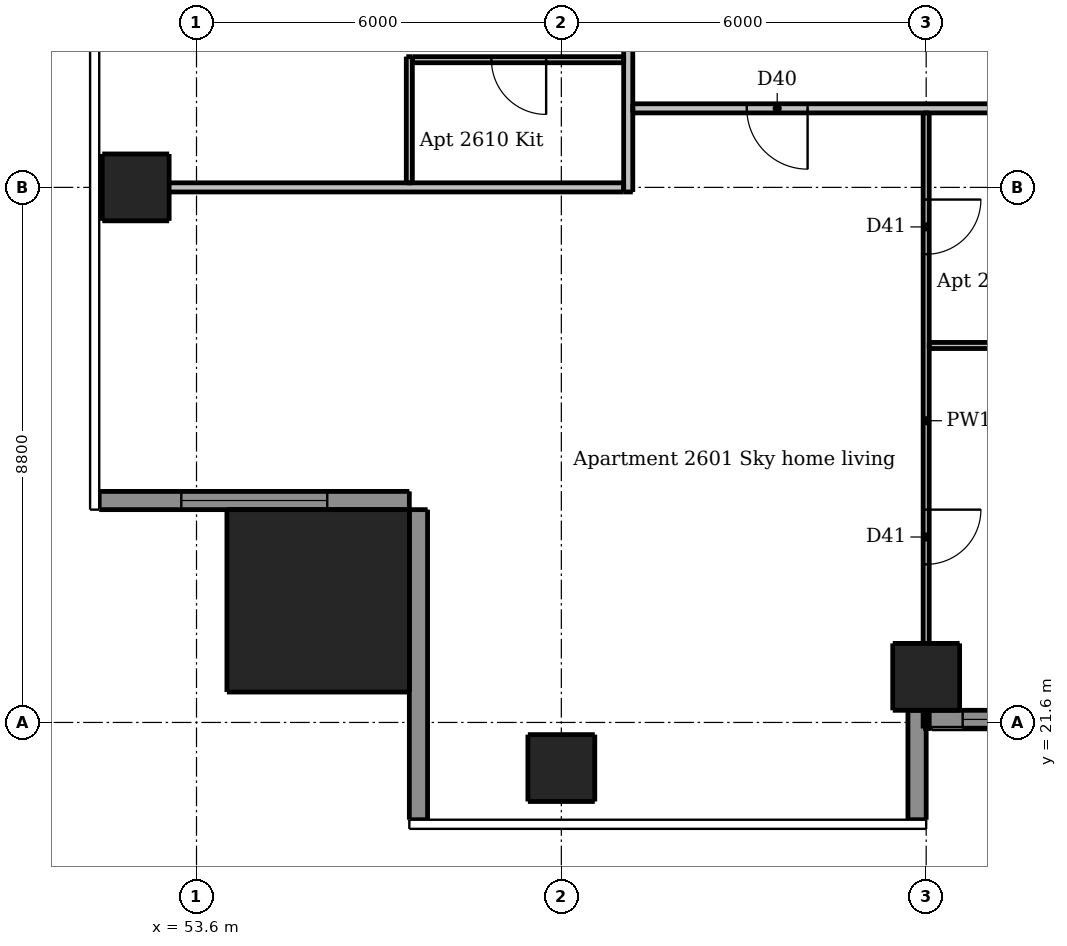
"""IFC4 building model, lengths in metres.
Left out: names, types, materials, properties, quantities, classifications, styles, units other than length and angle.
Written with IfcOpenShell. Run it as: python <this file> out.ifc"""

import sys

from ifc_helpers import new_model, si_unit, direction, frame, frame_2d, origin, origin_2d, place, context, subcontext, project, spatial, rectangle, extrude, element, fill, save


model = new_model("IFC4")
c1 = context("Model", 3, precision=1e-05, world=origin(), true_north=direction((0.0, 1.0)))
c2 = subcontext(c1, "Body", "Model", "MODEL_VIEW")
j1 = project(units=[si_unit("LENGTHUNIT", "METRE"), si_unit("PLANEANGLEUNIT", "RADIAN")], contexts=[c1])
p1 = place(None, origin())
s1 = spatial("IfcSite", under=j1, at=p1, CompositionType="ELEMENT")
p2 = place(p1, origin())
s2 = spatial("IfcBuilding", under=s1, at=p2, CompositionType="ELEMENT")
p3 = place(p2, frame((0.0, 0.0, 98.5)))
s3 = spatial("IfcBuildingStorey", under=s2, at=p3, CompositionType="ELEMENT", Elevation=98.5)
for number, where, z_axis, x_axis in (
    (1, (59.6, 20.85, 0.0), (0.0, 0.0, 1.0), (1.0, 0.0, 0.0)),
    (2, (65.6, 22.35, 0.0), (0.0, 0.0, 1.0), (1.0, 0.0, 0.0)),
    (3, (52.6, 30.4, 0.0), (0.0, 0.0, 1.0), (1.0, 0.0, 0.0)),
):
    element("IfcColumn", number, at=place(p3, frame(where, z_axis=z_axis, x_axis=x_axis)), inside=s3, PredefinedType="COLUMN", context=c2, shape_type="SweptSolid", body=[
        extrude(rectangle(XDim=1.1, YDim=1.1, at=origin_2d()), origin(), (0.0, 0.0, 1.0), 3.05),
    ])
p4 = place(p3, frame((55.6, 23.6, 0.0), z_axis=(0.0, 0.0, 1.0), x_axis=(1.0, 0.0, 0.0)))
e4 = element("IfcColumn", 4, at=p4, inside=s3, PredefinedType="COLUMN", context=c2, shape_type="SweptSolid", body=[
    extrude(rectangle(XDim=3.0, YDim=3.0, at=origin_2d()), origin(), (0.0, 0.0, 1.0), 3.3),
])
p5 = place(p3, frame((65.45, 20.0, 0.0), z_axis=(0.0, 0.0, 1.0), x_axis=(0.0, 1.0, 0.0)))
e5 = element("IfcWall", 5, at=p5, inside=s3, PredefinedType="SOLIDWALL", context=c2, shape_type="SweptSolid", body=[
    extrude(rectangle(XDim=1.8, YDim=0.3, at=frame_2d((0.9, 0.0))), origin(), (0.0, 0.0, 1.0), 3.05),
])
p6 = place(p3, frame((52.0, 25.25, 0.0), z_axis=(0.0, 0.0, 1.0), x_axis=(1.0, 0.0, 0.0)))
e6 = element("IfcWall", 6, at=p6, inside=s3, PredefinedType="SOLIDWALL", context=c2, shape_type="SweptSolid", body=[
    extrude(rectangle(XDim=5.1, YDim=0.3, at=frame_2d((2.55, 0.0))), origin(), (0.0, 0.0, 1.0), 3.05),
])
p7 = place(p6, frame((1.35, 0.0, 0.15)))
e7 = element("IfcOpeningElement", 7, at=p7, cuts=e6, PredefinedType="OPENING", context=c2, shape_type="SweptSolid", body=[
    extrude(rectangle(XDim=2.4, YDim=2.1, at=frame_2d((1.2, 1.05))), frame((0.0, 0.16, 0.0), z_axis=(0.0, -1.0, 0.0), x_axis=(1.0, 0.0, 0.0)), (0.0, 0.0, 1.0), 0.32),
])
p8 = place(p3, frame((57.25, 25.1, 0.0), z_axis=(0.0, 0.0, 1.0), x_axis=(0.0, -1.0, 0.0)))
e8 = element("IfcWall", 8, at=p8, inside=s3, PredefinedType="SOLIDWALL", context=c2, shape_type="SweptSolid", body=[
    extrude(rectangle(XDim=5.1, YDim=0.3, at=frame_2d((2.55, 0.0))), origin(), (0.0, 0.0, 1.0), 3.05),
])
p9 = place(p3, frame((65.6, 21.65, 0.0), z_axis=(0.0, 0.0, 1.0), x_axis=(1.0, 0.0, 0.0)))
e9 = element("IfcWall", 9, at=p9, inside=s3, PredefinedType="SOLIDWALL", context=c2, shape_type="SweptSolid", body=[
    extrude(rectangle(XDim=6.0, YDim=0.3, at=frame_2d((3.0, 0.0))), origin(), (0.0, 0.0, 1.0), 3.05),
])
p10 = place(p9, frame((0.6, 0.0, 0.15)))
e10 = element("IfcOpeningElement", 10, at=p10, cuts=e9, PredefinedType="OPENING", context=c2, shape_type="SweptSolid", body=[
    extrude(rectangle(XDim=1.8, YDim=2.1, at=frame_2d((0.9, 1.05))), frame((0.0, 0.16, 0.0), z_axis=(0.0, -1.0, 0.0), x_axis=(1.0, 0.0, 0.0)), (0.0, 0.0, 1.0), 0.32),
])
p11 = place(p9, frame((3.6, 0.0, 0.15)))
e11 = element("IfcOpeningElement", 11, at=p11, cuts=e9, PredefinedType="OPENING", context=c2, shape_type="SweptSolid", body=[
    extrude(rectangle(XDim=1.8, YDim=2.1, at=frame_2d((0.9, 1.05))), frame((0.0, 0.16, 0.0), z_axis=(0.0, -1.0, 0.0), x_axis=(1.0, 0.0, 0.0)), (0.0, 0.0, 1.0), 0.32),
])
p12 = place(p3, frame((57.1, 30.475, 0.0), z_axis=(0.0, 0.0, 1.0), x_axis=(0.0, 1.0, 0.0)))
e12 = element("IfcWall", 12, at=p12, inside=s3, PredefinedType="PARTITIONING", context=c2, shape_type="SweptSolid", body=[
    extrude(rectangle(XDim=2.075, YDim=0.1, at=frame_2d((1.038, 0.0))), origin(), (0.0, 0.0, 1.0), 3.05),
])
p13 = place(p3, frame((65.6, 31.625, 0.0), z_axis=(0.0, 0.0, 1.0), x_axis=(0.0, -1.0, 0.0)))
e13 = element("IfcWall", 13, at=p13, inside=s3, PredefinedType="PARTITIONING", context=c2, shape_type="SweptSolid", body=[
    extrude(rectangle(XDim=10.125, YDim=0.1, at=frame_2d((5.062, 0.0))), origin(), (0.0, 0.0, 1.0), 2.516),
])
p14 = place(p13, frame((1.425, 0.0, 0.0)))
e14 = element("IfcOpeningElement", 14, at=p14, cuts=e13, PredefinedType="OPENING", context=c2, shape_type="SweptSolid", body=[
    extrude(rectangle(XDim=0.9, YDim=2.1, at=frame_2d((0.45, 1.05))), frame((0.0, 0.06, 0.0), z_axis=(0.0, -1.0, 0.0), x_axis=(1.0, 0.0, 0.0)), (0.0, 0.0, 1.0), 0.12),
])
p15 = place(p13, frame((6.525, 0.0, 0.0)))
e15 = element("IfcOpeningElement", 15, at=p15, cuts=e13, PredefinedType="OPENING", context=c2, shape_type="SweptSolid", body=[
    extrude(rectangle(XDim=0.9, YDim=2.1, at=frame_2d((0.45, 1.05))), frame((0.0, 0.06, 0.0), z_axis=(0.0, -1.0, 0.0), x_axis=(1.0, 0.0, 0.0)), (0.0, 0.0, 1.0), 0.12),
])
p16 = place(p3, frame((60.625, 32.5, 0.0), z_axis=(0.0, 0.0, 1.0), x_axis=(-1.0, 0.0, 0.0)))
e16 = element("IfcWall", 16, at=p16, inside=s3, PredefinedType="PARTITIONING", context=c2, shape_type="SweptSolid", body=[
    extrude(rectangle(XDim=3.475, YDim=0.1, at=frame_2d((1.738, 0.0))), origin(), (0.0, 0.0, 1.0), 3.05),
])
p17 = place(p16, frame((1.275, 0.0, 0.0)))
e17 = element("IfcOpeningElement", 17, at=p17, cuts=e16, PredefinedType="OPENING", context=c2, shape_type="SweptSolid", body=[
    extrude(rectangle(XDim=0.9, YDim=2.1, at=frame_2d((0.45, 1.05))), frame((0.0, 0.06, 0.0), z_axis=(0.0, -1.0, 0.0), x_axis=(1.0, 0.0, 0.0)), (0.0, 0.0, 1.0), 0.12),
])
p18 = place(p3, frame((65.65, 27.8, 0.0), z_axis=(0.0, 0.0, 1.0), x_axis=(1.0, 0.0, 0.0)))
e18 = element("IfcWall", 18, at=p18, inside=s3, PredefinedType="PARTITIONING", context=c2, shape_type="SweptSolid", body=[
    extrude(rectangle(XDim=5.875, YDim=0.1, at=frame_2d((2.938, 0.0))), origin(), (0.0, 0.0, 1.0), 3.05),
])
p19 = place(p18, frame((3.75, 0.0, 0.0)))
e19 = element("IfcOpeningElement", 19, at=p19, cuts=e18, PredefinedType="OPENING", context=c2, shape_type="SweptSolid", body=[
    extrude(rectangle(XDim=0.8, YDim=2.1, at=frame_2d((0.4, 1.05))), frame((0.0, 0.06, 0.0), z_axis=(0.0, -1.0, 0.0), x_axis=(1.0, 0.0, 0.0)), (0.0, 0.0, 1.0), 0.12),
])
p20 = place(p3, frame((60.7, 30.325, 0.0), z_axis=(0.0, 0.0, 1.0), x_axis=(0.0, 1.0, 0.0)))
e20 = element("IfcWall", 20, at=p20, inside=s3, PredefinedType="PARTITIONING", context=c2, shape_type="SweptSolid", body=[
    extrude(rectangle(XDim=28.9, YDim=0.15, at=frame_2d((14.45, 0.0))), origin(), (0.0, 0.0, 1.0), 3.05),
])
p21 = place(p20, frame((2.575, 0.0, 0.0)))
e21 = element("IfcOpeningElement", 21, at=p21, cuts=e20, PredefinedType="OPENING", context=c2, shape_type="SweptSolid", body=[
    extrude(rectangle(XDim=1.0, YDim=2.1, at=frame_2d((0.5, 1.05))), frame((0.0, 0.085, 0.0), z_axis=(0.0, -1.0, 0.0), x_axis=(1.0, 0.0, 0.0)), (0.0, 0.0, 1.0), 0.17),
])
p22 = place(p20, frame((8.575, 0.0, 0.0)))
e22 = element("IfcOpeningElement", 22, at=p22, cuts=e20, PredefinedType="OPENING", context=c2, shape_type="SweptSolid", body=[
    extrude(rectangle(XDim=1.0, YDim=2.1, at=frame_2d((0.5, 1.05))), frame((0.0, 0.085, 0.0), z_axis=(0.0, -1.0, 0.0), x_axis=(1.0, 0.0, 0.0)), (0.0, 0.0, 1.0), 0.17),
])
p23 = place(p20, frame((14.575, 0.0, 0.0)))
e23 = element("IfcOpeningElement", 23, at=p23, cuts=e20, PredefinedType="OPENING", context=c2, shape_type="SweptSolid", body=[
    extrude(rectangle(XDim=1.0, YDim=2.1, at=frame_2d((0.5, 1.05))), frame((0.0, 0.085, 0.0), z_axis=(0.0, -1.0, 0.0), x_axis=(1.0, 0.0, 0.0)), (0.0, 0.0, 1.0), 0.17),
])
p24 = place(p20, frame((26.025, 0.0, 0.0)))
e24 = element("IfcOpeningElement", 24, at=p24, cuts=e20, PredefinedType="OPENING", context=c2, shape_type="SweptSolid", body=[
    extrude(rectangle(XDim=1.0, YDim=2.1, at=frame_2d((0.5, 1.05))), frame((0.0, 0.085, 0.0), z_axis=(0.0, -1.0, 0.0), x_axis=(1.0, 0.0, 0.0)), (0.0, 0.0, 1.0), 0.17),
])
p25 = place(p3, frame((89.525, 31.7, 0.0), z_axis=(0.0, 0.0, 1.0), x_axis=(-1.0, 0.0, 0.0)))
e25 = element("IfcWall", 25, at=p25, inside=s3, PredefinedType="PARTITIONING", context=c2, shape_type="SweptSolid", body=[
    extrude(rectangle(XDim=28.75, YDim=0.15, at=frame_2d((14.375, 0.0))), origin(), (0.0, 0.0, 1.0), 3.05),
])
p26 = place(p25, frame((25.875, 0.0, 0.0)))
e26 = element("IfcOpeningElement", 26, at=p26, cuts=e25, PredefinedType="OPENING", context=c2, shape_type="SweptSolid", body=[
    extrude(rectangle(XDim=1.0, YDim=2.1, at=frame_2d((0.5, 1.05))), frame((0.0, 0.085, 0.0), z_axis=(0.0, -1.0, 0.0), x_axis=(1.0, 0.0, 0.0)), (0.0, 0.0, 1.0), 0.17),
])
p27 = place(p25, frame((12.525, 0.0, 0.0)))
e27 = element("IfcOpeningElement", 27, at=p27, cuts=e25, PredefinedType="OPENING", context=c2, shape_type="SweptSolid", body=[
    extrude(rectangle(XDim=1.0, YDim=2.1, at=frame_2d((0.5, 1.05))), frame((0.0, 0.085, 0.0), z_axis=(0.0, -1.0, 0.0), x_axis=(1.0, 0.0, 0.0)), (0.0, 0.0, 1.0), 0.17),
])
p28 = place(p25, frame((4.175, 0.0, 0.0)))
e28 = element("IfcOpeningElement", 28, at=p28, cuts=e25, PredefinedType="OPENING", context=c2, shape_type="SweptSolid", body=[
    extrude(rectangle(XDim=1.0, YDim=2.1, at=frame_2d((0.5, 1.05))), frame((0.0, 0.085, 0.0), z_axis=(0.0, -1.0, 0.0), x_axis=(1.0, 0.0, 0.0)), (0.0, 0.0, 1.0), 0.17),
])
p29 = place(p3, frame((52.0, 30.4, 0.0), z_axis=(0.0, 0.0, 1.0), x_axis=(1.0, 0.0, 0.0)))
e29 = element("IfcWall", 29, at=p29, inside=s3, PredefinedType="PARTITIONING", context=c2, shape_type="SweptSolid", body=[
    extrude(rectangle(XDim=8.625, YDim=0.15, at=frame_2d((4.312, 0.0))), origin(), (0.0, 0.0, 1.0), 2.647),
])
p30 = place(p7, origin())
e30 = element("IfcWindow", 30, at=p30, inside=s3, PartitioningType="DOUBLE_PANEL_VERTICAL", PredefinedType="WINDOW", context=c2, shape_type="SweptSolid", body=[
    extrude(rectangle(XDim=2.4, YDim=2.1, at=frame_2d((1.2, 1.05))), frame((0.0, 0.03, 0.0), z_axis=(0.0, -1.0, 0.0), x_axis=(1.0, 0.0, 0.0)), (0.0, 0.0, 1.0), 0.06),
])
fill(e7, e30)
p31 = place(p10, origin())
e31 = element("IfcWindow", 31, at=p31, inside=s3, PartitioningType="DOUBLE_PANEL_VERTICAL", PredefinedType="WINDOW", context=c2, shape_type="SweptSolid", body=[
    extrude(rectangle(XDim=1.8, YDim=2.1, at=frame_2d((0.9, 1.05))), frame((0.0, 0.03, 0.0), z_axis=(0.0, -1.0, 0.0), x_axis=(1.0, 0.0, 0.0)), (0.0, 0.0, 1.0), 0.06),
])
fill(e10, e31)
p32 = place(p26, origin())
e32 = element("IfcDoor", 32, at=p32, inside=s3, OperationType="SINGLE_SWING_LEFT", PredefinedType="DOOR", context=c2, shape_type="SweptSolid", body=[
    extrude(rectangle(XDim=1.0, YDim=2.1, at=frame_2d((0.5, 1.05))), frame((0.0, 0.025, 0.0), z_axis=(0.0, -1.0, 0.0), x_axis=(1.0, 0.0, 0.0)), (0.0, 0.0, 1.0), 0.05),
])
fill(e26, e32)
p33 = place(p14, origin())
e33 = element("IfcDoor", 33, at=p33, inside=s3, OperationType="SINGLE_SWING_LEFT", PredefinedType="DOOR", context=c2, shape_type="SweptSolid", body=[
    extrude(rectangle(XDim=0.9, YDim=2.1, at=frame_2d((0.45, 1.05))), frame((0.0, 0.025, 0.0), z_axis=(0.0, -1.0, 0.0), x_axis=(1.0, 0.0, 0.0)), (0.0, 0.0, 1.0), 0.05),
])
fill(e14, e33)
p34 = place(p15, origin())
e34 = element("IfcDoor", 34, at=p34, inside=s3, OperationType="SINGLE_SWING_LEFT", PredefinedType="DOOR", context=c2, shape_type="SweptSolid", body=[
    extrude(rectangle(XDim=0.9, YDim=2.1, at=frame_2d((0.45, 1.05))), frame((0.0, 0.025, 0.0), z_axis=(0.0, -1.0, 0.0), x_axis=(1.0, 0.0, 0.0)), (0.0, 0.0, 1.0), 0.05),
])
fill(e15, e34)
p35 = place(p17, origin())
e35 = element("IfcDoor", 35, at=p35, inside=s3, OperationType="SINGLE_SWING_LEFT", PredefinedType="DOOR", context=c2, shape_type="SweptSolid", body=[
    extrude(rectangle(XDim=0.9, YDim=2.1, at=frame_2d((0.45, 1.05))), frame((0.0, 0.025, 0.0), z_axis=(0.0, -1.0, 0.0), x_axis=(1.0, 0.0, 0.0)), (0.0, 0.0, 1.0), 0.05),
])
fill(e17, e35)
save(model, sys.argv[1])
